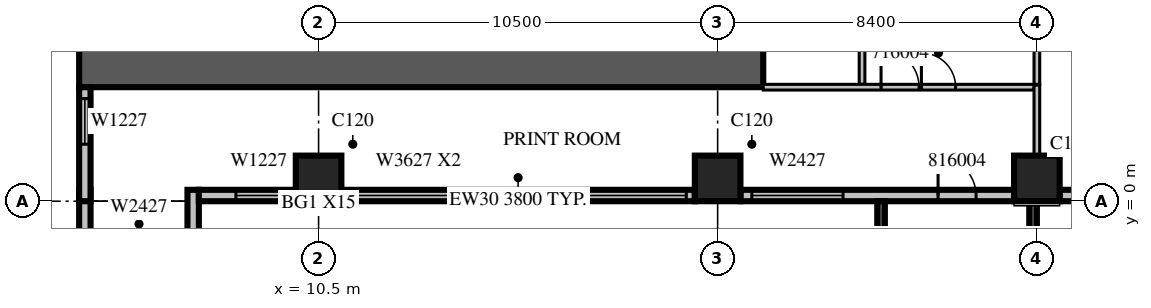
"""IFC4 building model, lengths in metres.
Left out: names, types, materials, properties, quantities, classifications, styles, units other than length and angle.
Written with IfcOpenShell. Run it as: python <this file> out.ifc"""

import sys

from ifc_helpers import new_model, si_unit, direction, frame, frame_2d, origin, origin_2d, place, context, subcontext, project, spatial, rectangle, extrude, source, transform, mapped, element, fill, save


model = new_model("IFC4")
c1 = context("Model", 3, precision=1e-05, world=origin(), true_north=direction((0.0, 1.0)))
c2 = subcontext(c1, "Body", "Model", "MODEL_VIEW")
j1 = project(units=[si_unit("LENGTHUNIT", "METRE"), si_unit("PLANEANGLEUNIT", "RADIAN")], contexts=[c1])
p1 = place(None, origin())
s1 = spatial("IfcSite", under=j1, at=p1, CompositionType="ELEMENT")
p2 = place(p1, origin())
s2 = spatial("IfcBuilding", under=s1, at=p2, CompositionType="ELEMENT")
p3 = place(p2, frame((0.0, 0.0, 78.3)))
s3 = spatial("IfcBuildingStorey", under=s2, at=p3, CompositionType="ELEMENT", Elevation=78.3)
m1 = source(origin(), c2, "Body", "SweptSolid", [
    extrude(rectangle(XDim=1.2, YDim=1.2, at=origin_2d()), origin(), (0.0, 0.0, 1.0), 4.2),
])
for number, where, z_axis, x_axis in (
    (1, (10.5, 0.6, 0.0), (0.0, 0.0, 1.0), (1.0, 0.0, 0.0)),
    (2, (21.0, 0.6, 0.0), (0.0, 0.0, 1.0), (1.0, 0.0, 0.0)),
    (3, (29.4, 0.6, 0.0), (0.0, 0.0, 1.0), (1.0, 0.0, 0.0)),
):
    element("IfcColumn", number, at=place(p3, frame(where, z_axis=z_axis, x_axis=x_axis)), inside=s3, PredefinedType="COLUMN", context=c2, shape_type="MappedRepresentation", body=[
        mapped(m1, transform((0.0, 0.0, 0.0), scale=1.0)),
    ])
m2 = source(origin(), c2, "Body", "SweptSolid", [
    extrude(rectangle(XDim=18.0, YDim=1.2, at=frame_2d((9.0, 0.0))), origin(), (0.0, 0.0, 1.0), 4.2),
])
p4 = place(p3, frame((4.2, 3.6, 0.0), z_axis=(0.0, 0.0, 1.0), x_axis=(1.0, 0.0, 0.0)))
e4 = element("IfcWall", 4, at=p4, inside=s3, PredefinedType="SHEAR", context=c2, shape_type="MappedRepresentation", body=[
    mapped(m2, transform((0.0, 0.0, 0.0), scale=1.0)),
])
m3 = source(origin(), c2, "Body", "SweptSolid", [
    extrude(rectangle(XDim=1.2, YDim=0.3, at=frame_2d((0.6, 0.0))), origin(), (0.0, 0.0, 1.0), 3.8),
])
for number, where, z_axis, x_axis in (
    (5, (4.35, 0.3, 0.0), (0.0, 0.0, 1.0), (0.0, -1.0, 0.0)),
    (6, (7.2, 0.3, 0.0), (0.0, 0.0, 1.0), (0.0, -1.0, 0.0)),
):
    element("IfcWall", number, at=place(p3, frame(where, z_axis=z_axis, x_axis=x_axis)), inside=s3, PredefinedType="STANDARD", context=c2, shape_type="MappedRepresentation", body=[
        mapped(m3, transform((0.0, 0.0, 0.0), scale=1.0)),
    ])
m4 = source(origin(), c2, "Body", "SweptSolid", [
    extrude(rectangle(XDim=2.55, YDim=0.3, at=frame_2d((1.275, 0.0))), origin(), (0.0, 0.0, 1.0), 3.8),
])
p5 = place(p3, frame((7.35, 0.15, 0.0), z_axis=(0.0, 0.0, 1.0), x_axis=(1.0, 0.0, 0.0)))
e7 = element("IfcWall", 7, at=p5, inside=s3, PredefinedType="STANDARD", context=c2, shape_type="MappedRepresentation", body=[
    mapped(m4, transform((0.0, 0.0, 0.0), scale=1.0)),
])
m5 = source(origin(), c2, "Body", "SweptSolid", [
    extrude(rectangle(XDim=1.2, YDim=2.7, at=frame_2d((0.6, 1.35))), frame((0.0, 0.16, 0.0), z_axis=(0.0, -1.0, 0.0), x_axis=(1.0, 0.0, 0.0)), (0.0, 0.0, 1.0), 0.32),
])
p6 = place(p5, frame((0.975, 0.0, 0.6)))
e8 = element("IfcOpeningElement", 8, at=p6, cuts=e7, PredefinedType="OPENING", context=c2, shape_type="MappedRepresentation", body=[
    mapped(m5, transform((0.0, 0.0, 0.0), scale=1.0)),
])
p7 = place(p3, frame((11.1, 0.15, 0.0), z_axis=(0.0, 0.0, 1.0), x_axis=(1.0, 0.0, 0.0)))
e9 = element("IfcWall", 9, at=p7, inside=s3, PredefinedType="STANDARD", context=c2, shape_type="SweptSolid", body=[
    extrude(rectangle(XDim=9.3, YDim=0.3, at=frame_2d((4.65, 0.0))), origin(), (0.0, 0.0, 1.0), 3.8),
])
m6 = source(origin(), c2, "Body", "SweptSolid", [
    extrude(rectangle(XDim=3.6, YDim=2.7, at=frame_2d((1.8, 1.35))), frame((0.0, 0.16, 0.0), z_axis=(0.0, -1.0, 0.0), x_axis=(1.0, 0.0, 0.0)), (0.0, 0.0, 1.0), 0.32),
])
p8 = place(p7, frame((0.225, 0.0, 0.6)))
e10 = element("IfcOpeningElement", 10, at=p8, cuts=e9, PredefinedType="OPENING", context=c2, shape_type="MappedRepresentation", body=[
    mapped(m6, transform((0.0, 0.0, 0.0), scale=1.0)),
])
p9 = place(p7, frame((5.475, 0.0, 0.6)))
e11 = element("IfcOpeningElement", 11, at=p9, cuts=e9, PredefinedType="OPENING", context=c2, shape_type="MappedRepresentation", body=[
    mapped(m6, transform((0.0, 0.0, 0.0), scale=1.0)),
])
m7 = source(origin(), c2, "Body", "SweptSolid", [
    extrude(rectangle(XDim=7.2, YDim=0.3, at=frame_2d((3.6, 0.0))), origin(), (0.0, 0.0, 1.0), 3.8),
])
p10 = place(p3, frame((21.6, 0.15, 0.0), z_axis=(0.0, 0.0, 1.0), x_axis=(1.0, 0.0, 0.0)))
e12 = element("IfcWall", 12, at=p10, inside=s3, PredefinedType="STANDARD", context=c2, shape_type="MappedRepresentation", body=[
    mapped(m7, transform((0.0, 0.0, 0.0), scale=1.0)),
])
m8 = source(origin(), c2, "Body", "SweptSolid", [
    extrude(rectangle(XDim=2.4, YDim=2.7, at=frame_2d((1.2, 1.35))), frame((0.0, 0.16, 0.0), z_axis=(0.0, -1.0, 0.0), x_axis=(1.0, 0.0, 0.0)), (0.0, 0.0, 1.0), 0.32),
])
p11 = place(p10, frame((0.3, 0.0, 0.6)))
e13 = element("IfcOpeningElement", 13, at=p11, cuts=e12, PredefinedType="OPENING", context=c2, shape_type="MappedRepresentation", body=[
    mapped(m8, transform((0.0, 0.0, 0.0), scale=1.0)),
])
m9 = source(origin(), c2, "Body", "SweptSolid", [
    extrude(rectangle(XDim=1.0, YDim=2.1, at=frame_2d((0.5, 1.05))), frame((0.0, 0.16, 0.0), z_axis=(0.0, -1.0, 0.0), x_axis=(1.0, 0.0, 0.0)), (0.0, 0.0, 1.0), 0.32),
])
p12 = place(p10, frame((5.2, 0.0, 0.0)))
e14 = element("IfcOpeningElement", 14, at=p12, cuts=e12, PredefinedType="OPENING", context=c2, shape_type="MappedRepresentation", body=[
    mapped(m9, transform((0.0, 0.0, 0.0), scale=1.0)),
])
p13 = place(p3, frame((30.0, 0.15, 0.0), z_axis=(0.0, 0.0, 1.0), x_axis=(1.0, 0.0, 0.0)))
e15 = element("IfcWall", 15, at=p13, inside=s3, PredefinedType="STANDARD", context=c2, shape_type="MappedRepresentation", body=[
    mapped(m7, transform((0.0, 0.0, 0.0), scale=1.0)),
])
p14 = place(p13, frame((2.5, 0.0, 0.6)))
e16 = element("IfcOpeningElement", 16, at=p14, cuts=e15, PredefinedType="OPENING", context=c2, shape_type="MappedRepresentation", body=[
    mapped(m8, transform((0.0, 0.0, 0.0), scale=1.0)),
])
m10 = source(origin(), c2, "Body", "SweptSolid", [
    extrude(rectangle(XDim=3.0, YDim=0.3, at=frame_2d((1.5, 0.0))), origin(), (0.0, 0.0, 1.0), 3.8),
])
p15 = place(p3, frame((4.35, 3.0, 0.0), z_axis=(0.0, 0.0, 1.0), x_axis=(0.0, -1.0, 0.0)))
e17 = element("IfcWall", 17, at=p15, inside=s3, PredefinedType="STANDARD", context=c2, shape_type="MappedRepresentation", body=[
    mapped(m10, transform((0.0, 0.0, 0.0), scale=1.0)),
])
p16 = place(p15, frame((0.3, 0.0, 0.6)))
e18 = element("IfcOpeningElement", 18, at=p16, cuts=e17, PredefinedType="OPENING", context=c2, shape_type="MappedRepresentation", body=[
    mapped(m5, transform((0.0, 0.0, 0.0), scale=1.0)),
])
m11 = source(origin(), c2, "Body", "SweptSolid", [
    extrude(rectangle(XDim=3.9, YDim=0.2, at=frame_2d((1.95, 0.0))), origin(), (0.0, 0.0, 1.0), 3.79),
])
p17 = place(p3, frame((25.3, 0.0, 0.0), z_axis=(0.0, 0.0, 1.0), x_axis=(0.0, -1.0, 0.0)))
e19 = element("IfcWall", 19, at=p17, inside=s3, PredefinedType="SOLIDWALL", context=c2, shape_type="MappedRepresentation", body=[
    mapped(m11, transform((0.0, 0.0, 0.0), scale=1.0)),
])
m12 = source(origin(), c2, "Body", "SweptSolid", [
    extrude(rectangle(XDim=2.4, YDim=2.7, at=frame_2d((1.2, 1.35))), frame((0.0, 0.11, 0.0), z_axis=(0.0, -1.0, 0.0), x_axis=(1.0, 0.0, 0.0)), (0.0, 0.0, 1.0), 0.22),
])
p18 = place(p17, frame((0.75, 0.0, 0.6)))
e20 = element("IfcOpeningElement", 20, at=p18, cuts=e19, PredefinedType="OPENING", context=c2, shape_type="MappedRepresentation", body=[
    mapped(m12, transform((0.0, 0.0, 0.0), scale=1.0)),
])
p19 = place(p3, frame((29.3, 0.0, 0.0), z_axis=(0.0, 0.0, 1.0), x_axis=(0.0, -1.0, 0.0)))
e21 = element("IfcWall", 21, at=p19, inside=s3, PredefinedType="SOLIDWALL", context=c2, shape_type="MappedRepresentation", body=[
    mapped(m11, transform((0.0, 0.0, 0.0), scale=1.0)),
])
p20 = place(p19, frame((0.75, 0.0, 0.6)))
e22 = element("IfcOpeningElement", 22, at=p20, cuts=e21, PredefinedType="OPENING", context=c2, shape_type="MappedRepresentation", body=[
    mapped(m12, transform((0.0, 0.0, 0.0), scale=1.0)),
])
m13 = source(origin(), c2, "Body", "SweptSolid", [
    extrude(rectangle(XDim=11.925, YDim=0.15, at=frame_2d((5.963, 0.0))), origin(), (0.0, 0.0, 1.0), 3.8),
])
p21 = place(p3, frame((24.8, 15.0, 0.0), z_axis=(0.0, 0.0, 1.0), x_axis=(0.0, -1.0, 0.0)))
e23 = element("IfcWall", 23, at=p21, inside=s3, PredefinedType="PARTITIONING", context=c2, shape_type="MappedRepresentation", body=[
    mapped(m13, transform((0.0, 0.0, 0.0), scale=1.0)),
])
m14 = source(origin(), c2, "Body", "SweptSolid", [
    extrude(rectangle(XDim=0.9, YDim=2.1, at=frame_2d((0.45, 1.05))), frame((0.0, 0.085, 0.0), z_axis=(0.0, -1.0, 0.0), x_axis=(1.0, 0.0, 0.0)), (0.0, 0.0, 1.0), 0.17),
])
p22 = place(p21, frame((8.363, 0.0, 0.0)))
e24 = element("IfcOpeningElement", 24, at=p22, cuts=e23, PredefinedType="OPENING", context=c2, shape_type="MappedRepresentation", body=[
    mapped(m14, transform((0.0, 0.0, 0.0), scale=1.0)),
])
p23 = place(p21, frame((1.525, 0.0, 0.0)))
e25 = element("IfcOpeningElement", 25, at=p23, cuts=e23, PredefinedType="OPENING", context=c2, shape_type="MappedRepresentation", body=[
    mapped(m14, transform((0.0, 0.0, 0.0), scale=1.0)),
])
m15 = source(origin(), c2, "Body", "SweptSolid", [
    extrude(rectangle(XDim=6.826, YDim=0.15, at=frame_2d((3.413, 0.0))), origin(), (0.0, 0.0, 1.0), 3.8),
])
p24 = place(p3, frame((29.4, 3.075, 0.0), z_axis=(0.0, 0.0, 1.0), x_axis=(0.0, 1.0, 0.0)))
e26 = element("IfcWall", 26, at=p24, inside=s3, PredefinedType="PARTITIONING", context=c2, shape_type="MappedRepresentation", body=[
    mapped(m15, transform((0.0, 0.0, 0.0), scale=1.0)),
])
m16 = source(origin(), c2, "Body", "SweptSolid", [
    extrude(rectangle(XDim=7.125, YDim=0.15, at=frame_2d((3.562, 0.0))), origin(), (0.0, 0.0, 1.0), 3.8),
])
p25 = place(p3, frame((22.2, 3.0, 0.0), z_axis=(0.0, 0.0, 1.0), x_axis=(1.0, 0.0, 0.0)))
e27 = element("IfcWall", 27, at=p25, inside=s3, PredefinedType="PARTITIONING", context=c2, shape_type="MappedRepresentation", body=[
    mapped(m16, transform((0.0, 0.0, 0.0), scale=1.0)),
])
m17 = source(origin(), c2, "Body", "SweptSolid", [
    extrude(rectangle(XDim=1.0, YDim=2.1, at=frame_2d((0.5, 1.05))), frame((0.0, 0.085, 0.0), z_axis=(0.0, -1.0, 0.0), x_axis=(1.0, 0.0, 0.0)), (0.0, 0.0, 1.0), 0.17),
])
p26 = place(p25, frame((3.1, 0.0, 0.0)))
e28 = element("IfcOpeningElement", 28, at=p26, cuts=e27, PredefinedType="OPENING", context=c2, shape_type="MappedRepresentation", body=[
    mapped(m17, transform((0.0, 0.0, 0.0), scale=1.0)),
])
p27 = place(p25, frame((4.162, 0.0, 0.0)))
e29 = element("IfcOpeningElement", 29, at=p27, cuts=e27, PredefinedType="OPENING", context=c2, shape_type="MappedRepresentation", body=[
    mapped(m14, transform((0.0, 0.0, 0.0), scale=1.0)),
])
m18 = source(origin(), c2, "Body", "SweptSolid", [
    extrude(rectangle(XDim=1.856, YDim=0.15, at=frame_2d((0.928, 0.0))), origin(), (0.0, 0.0, 1.0), 3.8),
])
p28 = place(p3, frame((29.4, 1.199, 0.0), z_axis=(0.0, 0.0, 1.0), x_axis=(0.0, 1.0, 0.0)))
e30 = element("IfcWall", 30, at=p28, inside=s3, PredefinedType="PARTITIONING", context=c2, shape_type="MappedRepresentation", body=[
    mapped(m18, transform((0.0, 0.0, 0.0), scale=1.0)),
])
m19 = source(origin(), c2, "Body", "SweptSolid", [
    extrude(rectangle(XDim=1.2, YDim=2.7, at=frame_2d((0.6, 1.35))), frame((0.0, 0.03, 0.0), z_axis=(0.0, -1.0, 0.0), x_axis=(1.0, 0.0, 0.0)), (0.0, 0.0, 1.0), 0.06),
])
p29 = place(p6, origin())
e31 = element("IfcWindow", 31, at=p29, inside=s3, PartitioningType="SINGLE_PANEL", PredefinedType="WINDOW", context=c2, shape_type="MappedRepresentation", body=[
    mapped(m19, transform((0.0, 0.0, 0.0), scale=1.0)),
])
fill(e8, e31)
m20 = source(origin(), c2, "Body", "SweptSolid", [
    extrude(rectangle(XDim=3.6, YDim=2.7, at=frame_2d((1.8, 1.35))), frame((0.0, 0.03, 0.0), z_axis=(0.0, -1.0, 0.0), x_axis=(1.0, 0.0, 0.0)), (0.0, 0.0, 1.0), 0.06),
])
p30 = place(p8, origin())
e32 = element("IfcWindow", 32, at=p30, inside=s3, PartitioningType="SINGLE_PANEL", PredefinedType="WINDOW", context=c2, shape_type="MappedRepresentation", body=[
    mapped(m20, transform((0.0, 0.0, 0.0), scale=1.0)),
])
fill(e10, e32)
p31 = place(p9, origin())
e33 = element("IfcWindow", 33, at=p31, inside=s3, PartitioningType="SINGLE_PANEL", PredefinedType="WINDOW", context=c2, shape_type="MappedRepresentation", body=[
    mapped(m20, transform((0.0, 0.0, 0.0), scale=1.0)),
])
fill(e11, e33)
m21 = source(origin(), c2, "Body", "SweptSolid", [
    extrude(rectangle(XDim=2.4, YDim=2.7, at=frame_2d((1.2, 1.35))), frame((0.0, 0.03, 0.0), z_axis=(0.0, -1.0, 0.0), x_axis=(1.0, 0.0, 0.0)), (0.0, 0.0, 1.0), 0.06),
])
p32 = place(p11, origin())
e34 = element("IfcWindow", 34, at=p32, inside=s3, PartitioningType="SINGLE_PANEL", PredefinedType="WINDOW", context=c2, shape_type="MappedRepresentation", body=[
    mapped(m21, transform((0.0, 0.0, 0.0), scale=1.0)),
])
fill(e13, e34)
p33 = place(p16, origin())
e35 = element("IfcWindow", 35, at=p33, inside=s3, PartitioningType="SINGLE_PANEL", PredefinedType="WINDOW", context=c2, shape_type="MappedRepresentation", body=[
    mapped(m19, transform((0.0, 0.0, 0.0), scale=1.0)),
])
fill(e18, e35)
m22 = source(origin(), c2, "Body", "SweptSolid", [
    extrude(rectangle(XDim=1.0, YDim=2.1, at=frame_2d((0.5, 1.05))), frame((0.0, 0.025, 0.0), z_axis=(0.0, -1.0, 0.0), x_axis=(1.0, 0.0, 0.0)), (0.0, 0.0, 1.0), 0.05),
])
p34 = place(p26, origin())
e36 = element("IfcDoor", 36, at=p34, inside=s3, OperationType="SINGLE_SWING_LEFT", PredefinedType="DOOR", context=c2, shape_type="MappedRepresentation", body=[
    mapped(m22, transform((0.0, 0.0, 0.0), scale=1.0)),
])
fill(e28, e36)
m23 = source(origin(), c2, "Body", "SweptSolid", [
    extrude(rectangle(XDim=0.9, YDim=2.1, at=frame_2d((0.45, 1.05))), frame((0.0, 0.025, 0.0), z_axis=(0.0, -1.0, 0.0), x_axis=(1.0, 0.0, 0.0)), (0.0, 0.0, 1.0), 0.05),
])
p35 = place(p27, origin())
e37 = element("IfcDoor", 37, at=p35, inside=s3, OperationType="SINGLE_SWING_LEFT", PredefinedType="DOOR", context=c2, shape_type="MappedRepresentation", body=[
    mapped(m23, transform((0.0, 0.0, 0.0), scale=1.0)),
])
fill(e29, e37)
p36 = place(p12, origin())
e38 = element("IfcDoor", 38, at=p36, inside=s3, OperationType="SINGLE_SWING_LEFT", PredefinedType="DOOR", context=c2, shape_type="MappedRepresentation", body=[
    mapped(m22, transform((0.0, 0.0, 0.0), scale=1.0)),
])
fill(e14, e38)
save(model, sys.argv[1])
